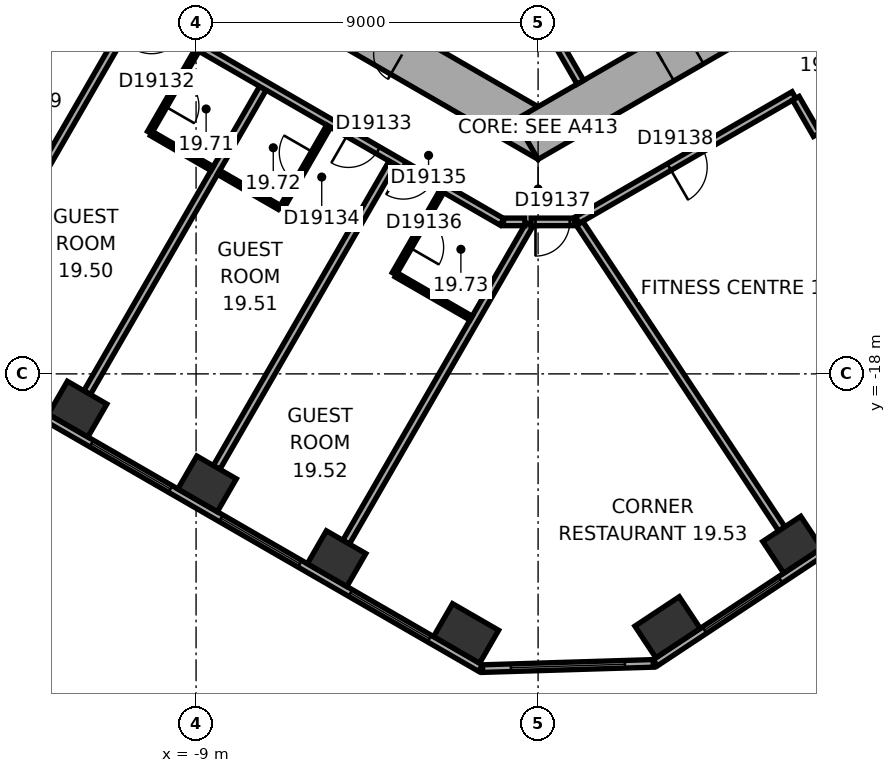
"""IFC4 building model, lengths in metres.
Left out: names, types, materials, properties, quantities, classifications, styles, units other than length and angle.
Written with IfcOpenShell. Run it as: python <this file> out.ifc"""

import sys

from ifc_helpers import new_model, si_unit, direction, frame, frame_2d, origin, origin_2d, place, context, subcontext, project, spatial, rectangle, extrude, element, fill, save


model = new_model("IFC4")
c1 = context("Model", 3, precision=1e-05, world=origin(), true_north=direction((0.0, 1.0)))
c2 = subcontext(c1, "Body", "Model", "MODEL_VIEW")
j1 = project(units=[si_unit("LENGTHUNIT", "METRE"), si_unit("PLANEANGLEUNIT", "RADIAN")], contexts=[c1])
p1 = place(None, origin())
s1 = spatial("IfcSite", under=j1, at=p1, CompositionType="ELEMENT")
p2 = place(p1, origin())
s2 = spatial("IfcBuilding", under=s1, at=p2, CompositionType="ELEMENT")
p3 = place(p2, frame((0.0, 0.0, 86.9)))
s3 = spatial("IfcBuildingStorey", under=s2, at=p3, CompositionType="ELEMENT", Elevation=86.9)
for number, where, z_axis, x_axis in (
    (1, (-12.117, -18.927, 0.0), (0.0, 0.0, 1.0), (0.866, -0.5, 0.0)),
    (2, (-8.71, -20.895, 0.0), (0.0, 0.0, 1.0), (0.866, -0.5, 0.0)),
    (3, (-5.302, -22.862, 0.0), (0.0, 0.0, 1.0), (0.866, -0.5, 0.0)),
):
    element("IfcColumn", number, at=place(p3, frame(where, z_axis=z_axis, x_axis=x_axis)), inside=s3, PredefinedType="COLUMN", context=c2, shape_type="SweptSolid", body=[
        extrude(rectangle(XDim=1.2, YDim=1.0, at=origin_2d()), origin(), (0.0, 0.0, 1.0), 3.3),
    ])
for number, where, z_axis, x_axis in (
    (4, (-1.895, -24.829, 0.0), (0.0, 0.0, 1.0), (0.866, -0.5, 0.0)),
    (5, (3.407, -24.667, 0.0), (0.0, 0.0, 1.0), (0.834, 0.552, 0.0)),
):
    element("IfcColumn", number, at=place(p3, frame(where, z_axis=z_axis, x_axis=x_axis)), inside=s3, PredefinedType="COLUMN", context=c2, shape_type="SweptSolid", body=[
        extrude(rectangle(XDim=1.4, YDim=1.0, at=origin_2d()), origin(), (0.0, 0.0, 1.0), 3.3),
    ])
p4 = place(p3, frame((6.688, -22.496, 0.0), z_axis=(0.0, 0.0, 1.0), x_axis=(0.833885822067, 0.551936985312, 0.0)))
e6 = element("IfcColumn", 6, at=p4, inside=s3, PredefinedType="COLUMN", context=c2, shape_type="SweptSolid", body=[
    extrude(rectangle(XDim=1.2, YDim=1.0, at=origin_2d()), origin(), (0.0, 0.0, 1.0), 3.3),
])
p5 = place(p3, frame((-10.4, -5.658, 0.0), z_axis=(0.0, 0.0, 1.0), x_axis=(0.866021384402, -0.500006961711, 0.0)))
e7 = element("IfcWall", 7, at=p5, inside=s3, PredefinedType="SHEAR", context=c2, shape_type="SweptSolid", body=[
    extrude(rectangle(XDim=12.355, YDim=1.2, at=frame_2d((6.178, 0.0))), origin(), (0.0, 0.0, 1.0), 3.3),
])
p6 = place(p5, frame((6.378, 0.0, 0.0)))
e8 = element("IfcOpeningElement", 8, at=p6, cuts=e7, PredefinedType="OPENING", context=c2, shape_type="SweptSolid", body=[
    extrude(rectangle(XDim=1.5, YDim=2.1, at=frame_2d((0.75, 1.05))), frame((0.0, 0.61, 0.0), z_axis=(0.0, -1.0, 0.0), x_axis=(1.0, 0.0, 0.0)), (0.0, 0.0, 1.0), 1.22),
])
p7 = place(p5, frame((3.228, 0.0, 0.0)))
e9 = element("IfcOpeningElement", 9, at=p7, cuts=e7, PredefinedType="OPENING", context=c2, shape_type="SweptSolid", body=[
    extrude(rectangle(XDim=0.9, YDim=2.1, at=frame_2d((0.45, 1.05))), frame((0.0, 0.61, 0.0), z_axis=(0.0, -1.0, 0.0), x_axis=(1.0, 0.0, 0.0)), (0.0, 0.0, 1.0), 1.22),
])
p8 = place(p3, frame((-0.3, -11.836, 0.0), z_axis=(0.0, 0.0, 1.0), x_axis=(0.866021384402, 0.500006961711, 0.0)))
e10 = element("IfcWall", 10, at=p8, inside=s3, PredefinedType="SHEAR", context=c2, shape_type="SweptSolid", body=[
    extrude(rectangle(XDim=12.355, YDim=1.2, at=frame_2d((6.178, 0.0))), origin(), (0.0, 0.0, 1.0), 3.3),
])
p9 = place(p8, frame((4.128, 0.0, 0.0)))
e11 = element("IfcOpeningElement", 11, at=p9, cuts=e10, PredefinedType="OPENING", context=c2, shape_type="SweptSolid", body=[
    extrude(rectangle(XDim=0.9, YDim=2.1, at=frame_2d((0.45, 1.05))), frame((0.0, 0.61, 0.0), z_axis=(0.0, -1.0, 0.0), x_axis=(1.0, 0.0, 0.0)), (0.0, 0.0, 1.0), 1.22),
])
p10 = place(p8, frame((7.928, 0.0, 0.0)))
e12 = element("IfcOpeningElement", 12, at=p10, cuts=e10, PredefinedType="OPENING", context=c2, shape_type="SweptSolid", body=[
    extrude(rectangle(XDim=1.1, YDim=2.1, at=frame_2d((0.55, 1.05))), frame((0.0, 0.61, 0.0), z_axis=(0.0, -1.0, 0.0), x_axis=(1.0, 0.0, 0.0)), (0.0, 0.0, 1.0), 1.22),
])
p11 = place(p3, frame((-19.914, -15.119, 0.0), z_axis=(0.0, 0.0, 1.0), x_axis=(0.866025418898, -0.499999973822, 0.0)))
e13 = element("IfcWall", 13, at=p11, inside=s3, PredefinedType="STANDARD", context=c2, shape_type="SweptSolid", body=[
    extrude(rectangle(XDim=21.246, YDim=0.2, at=frame_2d((10.623, 0.0))), origin(), (0.0, 0.0, 1.0), 3.3),
])
p12 = place(p11, frame((1.555, 0.0, 0.8)))
e14 = element("IfcOpeningElement", 14, at=p12, cuts=e13, PredefinedType="OPENING", context=c2, shape_type="SweptSolid", body=[
    extrude(rectangle(XDim=2.4, YDim=1.7, at=frame_2d((1.2, 0.85))), frame((0.0, 0.11, 0.0), z_axis=(0.0, -1.0, 0.0), x_axis=(1.0, 0.0, 0.0)), (0.0, 0.0, 1.0), 0.22),
])
p13 = place(p11, frame((5.489, 0.0, 0.8)))
e15 = element("IfcOpeningElement", 15, at=p13, cuts=e13, PredefinedType="OPENING", context=c2, shape_type="SweptSolid", body=[
    extrude(rectangle(XDim=2.4, YDim=1.7, at=frame_2d((1.2, 0.85))), frame((0.0, 0.11, 0.0), z_axis=(0.0, -1.0, 0.0), x_axis=(1.0, 0.0, 0.0)), (0.0, 0.0, 1.0), 0.22),
])
p14 = place(p11, frame((9.424, 0.0, 0.8)))
e16 = element("IfcOpeningElement", 16, at=p14, cuts=e13, PredefinedType="OPENING", context=c2, shape_type="SweptSolid", body=[
    extrude(rectangle(XDim=2.4, YDim=1.7, at=frame_2d((1.2, 0.85))), frame((0.0, 0.11, 0.0), z_axis=(0.0, -1.0, 0.0), x_axis=(1.0, 0.0, 0.0)), (0.0, 0.0, 1.0), 0.22),
])
p15 = place(p11, frame((13.358, 0.0, 0.8)))
e17 = element("IfcOpeningElement", 17, at=p15, cuts=e13, PredefinedType="OPENING", context=c2, shape_type="SweptSolid", body=[
    extrude(rectangle(XDim=2.4, YDim=1.7, at=frame_2d((1.2, 0.85))), frame((0.0, 0.11, 0.0), z_axis=(0.0, -1.0, 0.0), x_axis=(1.0, 0.0, 0.0)), (0.0, 0.0, 1.0), 0.22),
])
p16 = place(p11, frame((17.293, 0.0, 0.8)))
e18 = element("IfcOpeningElement", 18, at=p16, cuts=e13, PredefinedType="OPENING", context=c2, shape_type="SweptSolid", body=[
    extrude(rectangle(XDim=2.4, YDim=1.7, at=frame_2d((1.2, 0.85))), frame((0.0, 0.11, 0.0), z_axis=(0.0, -1.0, 0.0), x_axis=(1.0, 0.0, 0.0)), (0.0, 0.0, 1.0), 0.22),
])
p17 = place(p3, frame((-1.461, -25.755, 0.0), z_axis=(0.0, 0.0, 1.0), x_axis=(0.999533823446, 0.030530898895, 0.0)))
e19 = element("IfcWall", 19, at=p17, inside=s3, PredefinedType="STANDARD", context=c2, shape_type="SweptSolid", body=[
    extrude(rectangle(XDim=4.494, YDim=0.2, at=frame_2d((2.247, 0.0))), origin(), (0.0, 0.0, 1.0), 3.3),
])
p18 = place(p17, frame((0.747, 0.0, 0.8)))
e20 = element("IfcOpeningElement", 20, at=p18, cuts=e19, PredefinedType="OPENING", context=c2, shape_type="SweptSolid", body=[
    extrude(rectangle(XDim=3.0, YDim=1.7, at=frame_2d((1.5, 0.85))), frame((0.0, 0.11, 0.0), z_axis=(0.0, -1.0, 0.0), x_axis=(1.0, 0.0, 0.0)), (0.0, 0.0, 1.0), 0.22),
])
p19 = place(p3, frame((3.083, -25.601, 0.0), z_axis=(0.0, 0.0, 1.0), x_axis=(0.833884295743, 0.551939291329, 0.0)))
e21 = element("IfcWall", 21, at=p19, inside=s3, PredefinedType="STANDARD", context=c2, shape_type="SweptSolid", body=[
    extrude(rectangle(XDim=21.246, YDim=0.2, at=frame_2d((10.623, 0.0))), origin(), (0.0, 0.0, 1.0), 3.3),
])
p20 = place(p19, frame((1.553, 0.0, 0.8)))
e22 = element("IfcOpeningElement", 22, at=p20, cuts=e21, PredefinedType="OPENING", context=c2, shape_type="SweptSolid", body=[
    extrude(rectangle(XDim=2.4, YDim=1.7, at=frame_2d((1.2, 0.85))), frame((0.0, 0.11, 0.0), z_axis=(0.0, -1.0, 0.0), x_axis=(1.0, 0.0, 0.0)), (0.0, 0.0, 1.0), 0.22),
])
p21 = place(p19, frame((5.488, 0.0, 0.8)))
e23 = element("IfcOpeningElement", 23, at=p21, cuts=e21, PredefinedType="OPENING", context=c2, shape_type="SweptSolid", body=[
    extrude(rectangle(XDim=2.4, YDim=1.7, at=frame_2d((1.2, 0.85))), frame((0.0, 0.11, 0.0), z_axis=(0.0, -1.0, 0.0), x_axis=(1.0, 0.0, 0.0)), (0.0, 0.0, 1.0), 0.22),
])
p22 = place(p19, frame((9.422, 0.0, 0.8)))
e24 = element("IfcOpeningElement", 24, at=p22, cuts=e21, PredefinedType="OPENING", context=c2, shape_type="SweptSolid", body=[
    extrude(rectangle(XDim=2.4, YDim=1.7, at=frame_2d((1.2, 0.85))), frame((0.0, 0.11, 0.0), z_axis=(0.0, -1.0, 0.0), x_axis=(1.0, 0.0, 0.0)), (0.0, 0.0, 1.0), 0.22),
])
p23 = place(p19, frame((13.357, 0.0, 0.8)))
e25 = element("IfcOpeningElement", 25, at=p23, cuts=e21, PredefinedType="OPENING", context=c2, shape_type="SweptSolid", body=[
    extrude(rectangle(XDim=2.4, YDim=1.7, at=frame_2d((1.2, 0.85))), frame((0.0, 0.11, 0.0), z_axis=(0.0, -1.0, 0.0), x_axis=(1.0, 0.0, 0.0)), (0.0, 0.0, 1.0), 0.22),
])
p24 = place(p19, frame((17.291, 0.0, 0.8)))
e26 = element("IfcOpeningElement", 26, at=p24, cuts=e21, PredefinedType="OPENING", context=c2, shape_type="SweptSolid", body=[
    extrude(rectangle(XDim=2.4, YDim=1.7, at=frame_2d((1.2, 0.85))), frame((0.0, 0.11, 0.0), z_axis=(0.0, -1.0, 0.0), x_axis=(1.0, 0.0, 0.0)), (0.0, 0.0, 1.0), 0.22),
])
p25 = place(p3, frame((0.013, -8.422, 0.0), z_axis=(0.0, 0.0, 1.0), x_axis=(0.500077893725, -0.86598042715, 0.0)))
e27 = element("IfcWall", 27, at=p25, inside=s3, PredefinedType="PARTITIONING", context=c2, shape_type="SweptSolid", body=[
    extrude(rectangle(XDim=2.2, YDim=0.2, at=frame_2d((1.1, 0.0))), origin(), (0.0, 0.0, 1.0), 3.05),
])
p26 = place(p3, frame((-15.274, -16.527, 0.0), z_axis=(0.0, 0.0, 1.0), x_axis=(0.49998823431, 0.866032196602, 0.0)))
e28 = element("IfcWall", 28, at=p26, inside=s3, PredefinedType="PARTITIONING", context=c2, shape_type="SweptSolid", body=[
    extrude(rectangle(XDim=9.25, YDim=0.2, at=frame_2d((4.625, 0.0))), origin(), (0.0, 0.0, 1.0), 3.05),
])
p27 = place(p3, frame((-11.867, -18.494, 0.0), z_axis=(0.0, 0.0, 1.0), x_axis=(0.499999662836, 0.866025598446, 0.0)))
e29 = element("IfcWall", 29, at=p27, inside=s3, PredefinedType="PARTITIONING", context=c2, shape_type="SweptSolid", body=[
    extrude(rectangle(XDim=9.25, YDim=0.2, at=frame_2d((4.625, 0.0))), origin(), (0.0, 0.0, 1.0), 2.6),
])
p28 = place(p3, frame((-11.615, -7.843, 0.0), z_axis=(0.0, 0.0, 1.0), x_axis=(0.866026466995, -0.499998158461, 0.0)))
e30 = element("IfcWall", 30, at=p28, inside=s3, PredefinedType="PARTITIONING", context=c2, shape_type="SweptSolid", body=[
    extrude(rectangle(XDim=12.315, YDim=0.2, at=frame_2d((6.158, 0.0))), origin(), (0.0, 0.0, 1.0), 3.05),
])
p29 = place(p28, frame((1.665, 0.0, 0.0)))
e31 = element("IfcOpeningElement", 31, at=p29, cuts=e30, PredefinedType="OPENING", context=c2, shape_type="SweptSolid", body=[
    extrude(rectangle(XDim=0.9, YDim=2.1, at=frame_2d((0.45, 1.05))), frame((0.0, 0.11, 0.0), z_axis=(0.0, -1.0, 0.0), x_axis=(1.0, 0.0, 0.0)), (0.0, 0.0, 1.0), 0.22),
])
p30 = place(p28, frame((7.65, 0.0, 0.0)))
e32 = element("IfcOpeningElement", 32, at=p30, cuts=e30, PredefinedType="OPENING", context=c2, shape_type="SweptSolid", body=[
    extrude(rectangle(XDim=0.9, YDim=2.1, at=frame_2d((0.45, 1.05))), frame((0.0, 0.11, 0.0), z_axis=(0.0, -1.0, 0.0), x_axis=(1.0, 0.0, 0.0)), (0.0, 0.0, 1.0), 0.22),
])
p31 = place(p28, frame((9.317, 0.0, 0.0)))
e33 = element("IfcOpeningElement", 33, at=p31, cuts=e30, PredefinedType="OPENING", context=c2, shape_type="SweptSolid", body=[
    extrude(rectangle(XDim=0.9, YDim=2.1, at=frame_2d((0.45, 1.05))), frame((0.0, 0.11, 0.0), z_axis=(0.0, -1.0, 0.0), x_axis=(1.0, 0.0, 0.0)), (0.0, 0.0, 1.0), 0.22),
])
p32 = place(p3, frame((-10.224, -11.648, 0.0), z_axis=(0.0, 0.0, 1.0), x_axis=(0.500004234368, 0.866022959057, 0.0)))
e34 = element("IfcWall", 34, at=p32, inside=s3, PredefinedType="PARTITIONING", context=c2, shape_type="SweptSolid", body=[
    extrude(rectangle(XDim=2.5, YDim=0.12, at=frame_2d((1.25, 0.0))), origin(), (0.0, 0.0, 1.0), 3.05),
])
p33 = place(p32, frame((0.8, 0.0, 0.0)))
e35 = element("IfcOpeningElement", 35, at=p33, cuts=e34, PredefinedType="OPENING", context=c2, shape_type="SweptSolid", body=[
    extrude(rectangle(XDim=0.9, YDim=2.1, at=frame_2d((0.45, 1.05))), frame((0.0, 0.07, 0.0), z_axis=(0.0, -1.0, 0.0), x_axis=(1.0, 0.0, 0.0)), (0.0, 0.0, 1.0), 0.14),
])
p34 = place(p3, frame((-8.579, -12.598, 0.0), z_axis=(0.0, 0.0, 1.0), x_axis=(-0.866046386007, 0.499963655964, 0.0)))
e36 = element("IfcWall", 36, at=p34, inside=s3, PredefinedType="PARTITIONING", context=c2, shape_type="SweptSolid", body=[
    extrude(rectangle(XDim=1.84, YDim=0.12, at=frame_2d((0.92, 0.0))), origin(), (0.0, 0.0, 1.0), 3.05),
])
p35 = place(p3, frame((-8.46, -20.461, 0.0), z_axis=(0.0, 0.0, 1.0), x_axis=(0.499999662836, 0.866025598446, 0.0)))
e37 = element("IfcWall", 37, at=p35, inside=s3, PredefinedType="PARTITIONING", context=c2, shape_type="SweptSolid", body=[
    extrude(rectangle(XDim=9.25, YDim=0.2, at=frame_2d((4.625, 0.0))), origin(), (0.0, 0.0, 1.0), 3.05),
])
p36 = place(p3, frame((-6.812, -13.618, 0.0), z_axis=(0.0, 0.0, 1.0), x_axis=(-0.866046386007, 0.499963655964, 0.0)))
e38 = element("IfcWall", 38, at=p36, inside=s3, PredefinedType="PARTITIONING", context=c2, shape_type="SweptSolid", body=[
    extrude(rectangle(XDim=1.84, YDim=0.12, at=frame_2d((0.92, 0.0))), origin(), (0.0, 0.0, 1.0), 3.05),
])
p37 = place(p3, frame((-5.51, -11.483, 0.0), z_axis=(0.0, 0.0, 1.0), x_axis=(-0.500004234368, -0.866022959057, 0.0)))
e39 = element("IfcWall", 39, at=p37, inside=s3, PredefinedType="PARTITIONING", context=c2, shape_type="SweptSolid", body=[
    extrude(rectangle(XDim=2.5, YDim=0.12, at=frame_2d((1.25, 0.0))), origin(), (0.0, 0.0, 1.0), 3.05),
])
p38 = place(p37, frame((0.8, 0.0, 0.0)))
e40 = element("IfcOpeningElement", 40, at=p38, cuts=e39, PredefinedType="OPENING", context=c2, shape_type="SweptSolid", body=[
    extrude(rectangle(XDim=0.9, YDim=2.1, at=frame_2d((0.45, 1.05))), frame((0.0, 0.07, 0.0), z_axis=(0.0, -1.0, 0.0), x_axis=(1.0, 0.0, 0.0)), (0.0, 0.0, 1.0), 0.14),
])
p39 = place(p3, frame((-5.052, -22.429, 0.0), z_axis=(0.0, 0.0, 1.0), x_axis=(0.50000569793, 0.866022114058, 0.0)))
e41 = element("IfcWall", 41, at=p39, inside=s3, PredefinedType="PARTITIONING", context=c2, shape_type="SweptSolid", body=[
    extrude(rectangle(XDim=9.65, YDim=0.2, at=frame_2d((4.825, 0.0))), origin(), (0.0, 0.0, 1.0), 3.05),
])
p40 = place(p3, frame((-3.786, -15.366, 0.0), z_axis=(0.0, 0.0, 1.0), x_axis=(0.500004234368, 0.866022959057, 0.0)))
e42 = element("IfcWall", 42, at=p40, inside=s3, PredefinedType="PARTITIONING", context=c2, shape_type="SweptSolid", body=[
    extrude(rectangle(XDim=2.5, YDim=0.12, at=frame_2d((1.25, 0.0))), origin(), (0.0, 0.0, 1.0), 3.05),
])
p41 = place(p40, frame((0.8, 0.0, 0.0)))
e43 = element("IfcOpeningElement", 43, at=p41, cuts=e42, PredefinedType="OPENING", context=c2, shape_type="SweptSolid", body=[
    extrude(rectangle(XDim=0.9, YDim=2.1, at=frame_2d((0.45, 1.05))), frame((0.0, 0.07, 0.0), z_axis=(0.0, -1.0, 0.0), x_axis=(1.0, 0.0, 0.0)), (0.0, 0.0, 1.0), 0.14),
])
p42 = place(p3, frame((-1.764, -16.533, 0.0), z_axis=(0.0, 0.0, 1.0), x_axis=(-0.866008641419, 0.500029032144, 0.0)))
e44 = element("IfcWall", 44, at=p42, inside=s3, PredefinedType="PARTITIONING", context=c2, shape_type="SweptSolid", body=[
    extrude(rectangle(XDim=2.275, YDim=0.12, at=frame_2d((1.137, 0.0))), origin(), (0.0, 0.0, 1.0), 3.05),
])
p43 = place(p3, frame((-0.91, -14.001, 0.0), z_axis=(0.0, 0.0, 1.0), x_axis=(1.0, 0.0, 0.0)))
e45 = element("IfcWall", 45, at=p43, inside=s3, PredefinedType="PARTITIONING", context=c2, shape_type="SweptSolid", body=[
    extrude(rectangle(XDim=0.56, YDim=0.2, at=frame_2d((0.28, 0.0))), origin(), (0.0, 0.0, 1.0), 3.05),
])
p44 = place(p3, frame((-0.186, -14.001, 0.0), z_axis=(0.0, 0.0, 1.0), x_axis=(1.0, 0.0, 0.0)))
e46 = element("IfcWall", 46, at=p44, inside=s3, PredefinedType="PARTITIONING", context=c2, shape_type="SweptSolid", body=[
    extrude(rectangle(XDim=1.136, YDim=0.2, at=frame_2d((0.568, 0.0))), origin(), (0.0, 0.0, 1.0), 3.05),
])
p45 = place(p44, frame((0.118, 0.0, 0.0)))
e47 = element("IfcOpeningElement", 47, at=p45, cuts=e46, PredefinedType="OPENING", context=c2, shape_type="SweptSolid", body=[
    extrude(rectangle(XDim=0.9, YDim=2.1, at=frame_2d((0.45, 1.05))), frame((0.0, 0.11, 0.0), z_axis=(0.0, -1.0, 0.0), x_axis=(1.0, 0.0, 0.0)), (0.0, 0.0, 1.0), 0.22),
])
p46 = place(p3, frame((1.033, -13.953, 0.0), z_axis=(0.0, 0.0, 1.0), x_axis=(0.866017531406, 0.500013635111, 0.0)))
e48 = element("IfcWall", 48, at=p46, inside=s3, PredefinedType="PARTITIONING", context=c2, shape_type="SweptSolid", body=[
    extrude(rectangle(XDim=6.58, YDim=0.2, at=frame_2d((3.29, 0.0))), origin(), (0.0, 0.0, 1.0), 3.05),
])
p47 = place(p46, frame((2.79, 0.0, 0.0)))
e49 = element("IfcOpeningElement", 49, at=p47, cuts=e48, PredefinedType="OPENING", context=c2, shape_type="SweptSolid", body=[
    extrude(rectangle(XDim=1.0, YDim=2.1, at=frame_2d((0.5, 1.05))), frame((0.0, 0.11, 0.0), z_axis=(0.0, -1.0, 0.0), x_axis=(1.0, 0.0, 0.0)), (0.0, 0.0, 1.0), 0.22),
])
p48 = place(p3, frame((6.412, -22.079, 0.0), z_axis=(0.0, 0.0, 1.0), x_axis=(-0.551919507115, 0.83389739037, 0.0)))
e50 = element("IfcWall", 50, at=p48, inside=s3, PredefinedType="PARTITIONING", context=c2, shape_type="SweptSolid", body=[
    extrude(rectangle(XDim=9.635, YDim=0.2, at=frame_2d((4.817, 0.0))), origin(), (0.0, 0.0, 1.0), 3.05),
])
p49 = place(p3, frame((6.782, -10.749, 0.0), z_axis=(0.0, 0.0, 1.0), x_axis=(0.500074377092, -0.865982457891, 0.0)))
e51 = element("IfcWall", 51, at=p49, inside=s3, PredefinedType="PARTITIONING", context=c2, shape_type="SweptSolid", body=[
    extrude(rectangle(XDim=1.101, YDim=0.2, at=frame_2d((0.55, 0.0))), origin(), (0.0, 0.0, 1.0), 3.05),
])
p50 = place(p14, origin())
e52 = element("IfcWindow", 52, at=p50, inside=s3, PartitioningType="SINGLE_PANEL", PredefinedType="WINDOW", context=c2, shape_type="SweptSolid", body=[
    extrude(rectangle(XDim=2.4, YDim=1.7, at=frame_2d((1.2, 0.85))), frame((0.0, 0.03, 0.0), z_axis=(0.0, -1.0, 0.0), x_axis=(1.0, 0.0, 0.0)), (0.0, 0.0, 1.0), 0.06),
])
fill(e16, e52)
p51 = place(p15, origin())
e53 = element("IfcWindow", 53, at=p51, inside=s3, PartitioningType="SINGLE_PANEL", PredefinedType="WINDOW", context=c2, shape_type="SweptSolid", body=[
    extrude(rectangle(XDim=2.4, YDim=1.7, at=frame_2d((1.2, 0.85))), frame((0.0, 0.03, 0.0), z_axis=(0.0, -1.0, 0.0), x_axis=(1.0, 0.0, 0.0)), (0.0, 0.0, 1.0), 0.06),
])
fill(e17, e53)
p52 = place(p16, origin())
e54 = element("IfcWindow", 54, at=p52, inside=s3, PartitioningType="SINGLE_PANEL", PredefinedType="WINDOW", context=c2, shape_type="SweptSolid", body=[
    extrude(rectangle(XDim=2.4, YDim=1.7, at=frame_2d((1.2, 0.85))), frame((0.0, 0.03, 0.0), z_axis=(0.0, -1.0, 0.0), x_axis=(1.0, 0.0, 0.0)), (0.0, 0.0, 1.0), 0.06),
])
fill(e18, e54)
p53 = place(p18, origin())
e55 = element("IfcWindow", 55, at=p53, inside=s3, PartitioningType="SINGLE_PANEL", PredefinedType="WINDOW", context=c2, shape_type="SweptSolid", body=[
    extrude(rectangle(XDim=3.0, YDim=1.7, at=frame_2d((1.5, 0.85))), frame((0.0, 0.03, 0.0), z_axis=(0.0, -1.0, 0.0), x_axis=(1.0, 0.0, 0.0)), (0.0, 0.0, 1.0), 0.06),
])
fill(e20, e55)
p54 = place(p20, origin())
e56 = element("IfcWindow", 56, at=p54, inside=s3, PartitioningType="SINGLE_PANEL", PredefinedType="WINDOW", context=c2, shape_type="SweptSolid", body=[
    extrude(rectangle(XDim=2.4, YDim=1.7, at=frame_2d((1.2, 0.85))), frame((0.0, 0.03, 0.0), z_axis=(0.0, -1.0, 0.0), x_axis=(1.0, 0.0, 0.0)), (0.0, 0.0, 1.0), 0.06),
])
fill(e22, e56)
p55 = place(p6, origin())
e57 = element("IfcDoor", 57, at=p55, inside=s3, OperationType="DOUBLE_DOOR_SINGLE_SWING", PredefinedType="DOOR", context=c2, shape_type="SweptSolid", body=[
    extrude(rectangle(XDim=1.5, YDim=2.1, at=frame_2d((0.75, 1.05))), frame((0.0, 0.025, 0.0), z_axis=(0.0, -1.0, 0.0), x_axis=(1.0, 0.0, 0.0)), (0.0, 0.0, 1.0), 0.05),
])
fill(e8, e57)
p56 = place(p9, origin())
e58 = element("IfcDoor", 58, at=p56, inside=s3, OperationType="SINGLE_SWING_LEFT", PredefinedType="DOOR", context=c2, shape_type="SweptSolid", body=[
    extrude(rectangle(XDim=0.9, YDim=2.1, at=frame_2d((0.45, 1.05))), frame((0.0, 0.025, 0.0), z_axis=(0.0, -1.0, 0.0), x_axis=(1.0, 0.0, 0.0)), (0.0, 0.0, 1.0), 0.05),
])
fill(e11, e58)
p57 = place(p33, origin())
e59 = element("IfcDoor", 59, at=p57, inside=s3, OperationType="SINGLE_SWING_LEFT", PredefinedType="DOOR", context=c2, shape_type="SweptSolid", body=[
    extrude(rectangle(XDim=0.9, YDim=2.1, at=frame_2d((0.45, 1.05))), frame((0.0, 0.025, 0.0), z_axis=(0.0, -1.0, 0.0), x_axis=(1.0, 0.0, 0.0)), (0.0, 0.0, 1.0), 0.05),
])
fill(e35, e59)
p58 = place(p30, origin())
e60 = element("IfcDoor", 60, at=p58, inside=s3, OperationType="SINGLE_SWING_LEFT", PredefinedType="DOOR", context=c2, shape_type="SweptSolid", body=[
    extrude(rectangle(XDim=0.9, YDim=2.1, at=frame_2d((0.45, 1.05))), frame((0.0, 0.025, 0.0), z_axis=(0.0, -1.0, 0.0), x_axis=(1.0, 0.0, 0.0)), (0.0, 0.0, 1.0), 0.05),
])
fill(e32, e60)
p59 = place(p38, origin())
e61 = element("IfcDoor", 61, at=p59, inside=s3, OperationType="SINGLE_SWING_LEFT", PredefinedType="DOOR", context=c2, shape_type="SweptSolid", body=[
    extrude(rectangle(XDim=0.9, YDim=2.1, at=frame_2d((0.45, 1.05))), frame((0.0, 0.025, 0.0), z_axis=(0.0, -1.0, 0.0), x_axis=(1.0, 0.0, 0.0)), (0.0, 0.0, 1.0), 0.05),
])
fill(e40, e61)
p60 = place(p31, origin())
e62 = element("IfcDoor", 62, at=p60, inside=s3, OperationType="SINGLE_SWING_LEFT", PredefinedType="DOOR", context=c2, shape_type="SweptSolid", body=[
    extrude(rectangle(XDim=0.9, YDim=2.1, at=frame_2d((0.45, 1.05))), frame((0.0, 0.025, 0.0), z_axis=(0.0, -1.0, 0.0), x_axis=(1.0, 0.0, 0.0)), (0.0, 0.0, 1.0), 0.05),
])
fill(e33, e62)
p61 = place(p41, origin())
e63 = element("IfcDoor", 63, at=p61, inside=s3, OperationType="SINGLE_SWING_LEFT", PredefinedType="DOOR", context=c2, shape_type="SweptSolid", body=[
    extrude(rectangle(XDim=0.9, YDim=2.1, at=frame_2d((0.45, 1.05))), frame((0.0, 0.025, 0.0), z_axis=(0.0, -1.0, 0.0), x_axis=(1.0, 0.0, 0.0)), (0.0, 0.0, 1.0), 0.05),
])
fill(e43, e63)
p62 = place(p45, origin())
e64 = element("IfcDoor", 64, at=p62, inside=s3, OperationType="SINGLE_SWING_LEFT", PredefinedType="DOOR", context=c2, shape_type="SweptSolid", body=[
    extrude(rectangle(XDim=0.9, YDim=2.1, at=frame_2d((0.45, 1.05))), frame((0.0, 0.025, 0.0), z_axis=(0.0, -1.0, 0.0), x_axis=(1.0, 0.0, 0.0)), (0.0, 0.0, 1.0), 0.05),
])
fill(e47, e64)
p63 = place(p47, origin())
e65 = element("IfcDoor", 65, at=p63, inside=s3, OperationType="SINGLE_SWING_LEFT", PredefinedType="DOOR", context=c2, shape_type="SweptSolid", body=[
    extrude(rectangle(XDim=1.0, YDim=2.1, at=frame_2d((0.5, 1.05))), frame((0.0, 0.025, 0.0), z_axis=(0.0, -1.0, 0.0), x_axis=(1.0, 0.0, 0.0)), (0.0, 0.0, 1.0), 0.05),
])
fill(e49, e65)
save(model, sys.argv[1])
